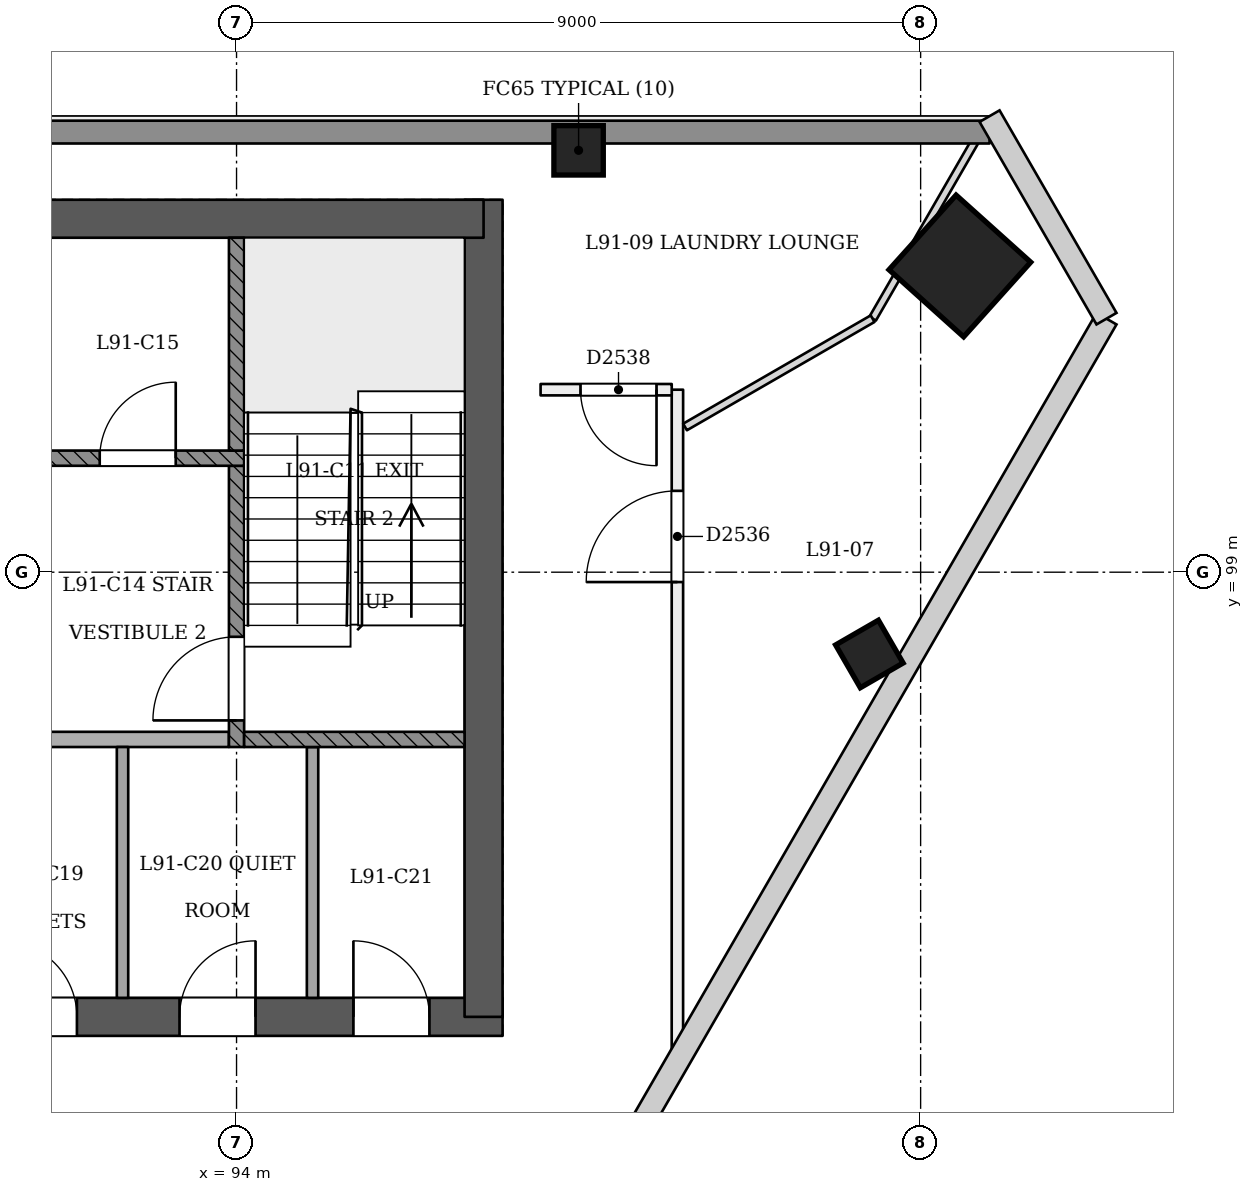
"""IFC4 building model, lengths in metres.
Left out: names, types, materials, properties, quantities, classifications, styles, units other than length and angle.
Written with IfcOpenShell. Run it as: python <this file> out.ifc"""

import sys

from ifc_helpers import new_model, si_unit, direction, frame, frame_2d, origin, origin_2d, place, context, subcontext, project, spatial, rectangle, extrude, element, fill, save


model = new_model("IFC4")
c1 = context("Model", 3, precision=1e-05, world=origin(), true_north=direction((0.0, 1.0)))
c2 = subcontext(c1, "Body", "Model", "MODEL_VIEW")
j1 = project(units=[si_unit("LENGTHUNIT", "METRE"), si_unit("PLANEANGLEUNIT", "RADIAN")], contexts=[c1])
p1 = place(None, origin())
s1 = spatial("IfcSite", under=j1, at=p1, CompositionType="ELEMENT")
p2 = place(p1, origin())
s2 = spatial("IfcBuilding", under=s1, at=p2, CompositionType="ELEMENT")
p3 = place(p2, frame((0.0, 0.0, 350.8)))
s3 = spatial("IfcBuildingStorey", under=s2, at=p3, CompositionType="ELEMENT", Elevation=350.8)
p4 = place(p3, frame((72.75, 93.15, 0.0), z_axis=(0.0, 0.0, 1.0), x_axis=(1.0, 0.0, 0.0)))
e1 = element("IfcWall", 1, at=p4, inside=s3, PredefinedType="SHEAR", context=c2, shape_type="SweptSolid", body=[
    extrude(rectangle(XDim=24.75, YDim=0.5, at=frame_2d((12.375, 0.0))), origin(), (0.0, 0.0, 1.0), 3.6),
])
p5 = place(p4, frame((1.05, 0.0, 0.0)))
e2 = element("IfcOpeningElement", 2, at=p5, cuts=e1, PredefinedType="OPENING", context=c2, shape_type="SweptSolid", body=[
    extrude(rectangle(XDim=1.2, YDim=2.1, at=frame_2d((0.6, 1.05))), frame((0.0, 0.26, 0.0), z_axis=(0.0, -1.0, 0.0), x_axis=(1.0, 0.0, 0.0)), (0.0, 0.0, 1.0), 0.521),
])
p6 = place(p4, frame((3.25, 0.0, 0.0)))
e3 = element("IfcOpeningElement", 3, at=p6, cuts=e1, PredefinedType="OPENING", context=c2, shape_type="SweptSolid", body=[
    extrude(rectangle(XDim=1.2, YDim=2.1, at=frame_2d((0.6, 1.05))), frame((0.0, 0.26, 0.0), z_axis=(0.0, -1.0, 0.0), x_axis=(1.0, 0.0, 0.0)), (0.0, 0.0, 1.0), 0.521),
])
p7 = place(p4, frame((13.25, 0.0, 0.0)))
e4 = element("IfcOpeningElement", 4, at=p7, cuts=e1, PredefinedType="OPENING", context=c2, shape_type="SweptSolid", body=[
    extrude(rectangle(XDim=1.2, YDim=2.1, at=frame_2d((0.6, 1.05))), frame((0.0, 0.26, 0.0), z_axis=(0.0, -1.0, 0.0), x_axis=(1.0, 0.0, 0.0)), (0.0, 0.0, 1.0), 0.521),
])
p8 = place(p4, frame((15.712, 0.0, 0.0)))
e5 = element("IfcOpeningElement", 5, at=p8, cuts=e1, PredefinedType="OPENING", context=c2, shape_type="SweptSolid", body=[
    extrude(rectangle(XDim=1.0, YDim=2.1, at=frame_2d((0.5, 1.05))), frame((0.0, 0.26, 0.0), z_axis=(0.0, -1.0, 0.0), x_axis=(1.0, 0.0, 0.0)), (0.0, 0.0, 1.0), 0.521),
])
p9 = place(p4, frame((18.15, 0.0, 0.0)))
e6 = element("IfcOpeningElement", 6, at=p9, cuts=e1, PredefinedType="OPENING", context=c2, shape_type="SweptSolid", body=[
    extrude(rectangle(XDim=1.0, YDim=2.1, at=frame_2d((0.5, 1.05))), frame((0.0, 0.26, 0.0), z_axis=(0.0, -1.0, 0.0), x_axis=(1.0, 0.0, 0.0)), (0.0, 0.0, 1.0), 0.521),
])
p10 = place(p4, frame((20.5, 0.0, 0.0)))
e7 = element("IfcOpeningElement", 7, at=p10, cuts=e1, PredefinedType="OPENING", context=c2, shape_type="SweptSolid", body=[
    extrude(rectangle(XDim=1.0, YDim=2.1, at=frame_2d((0.5, 1.05))), frame((0.0, 0.26, 0.0), z_axis=(0.0, -1.0, 0.0), x_axis=(1.0, 0.0, 0.0)), (0.0, 0.0, 1.0), 0.521),
])
p11 = place(p4, frame((22.788, 0.0, 0.0)))
e8 = element("IfcOpeningElement", 8, at=p11, cuts=e1, PredefinedType="OPENING", context=c2, shape_type="SweptSolid", body=[
    extrude(rectangle(XDim=1.0, YDim=2.1, at=frame_2d((0.5, 1.05))), frame((0.0, 0.26, 0.0), z_axis=(0.0, -1.0, 0.0), x_axis=(1.0, 0.0, 0.0)), (0.0, 0.0, 1.0), 0.521),
])
p12 = place(p3, frame((97.25, 93.15, 0.0), z_axis=(0.0, 0.0, 1.0), x_axis=(0.0, 1.0, 0.0)))
e9 = element("IfcWall", 9, at=p12, inside=s3, PredefinedType="SHEAR", context=c2, shape_type="SweptSolid", body=[
    extrude(rectangle(XDim=10.75, YDim=0.5, at=frame_2d((5.375, 0.0))), origin(), (0.0, 0.0, 1.0), 3.6),
])
p13 = place(p3, frame((97.25, 103.65, 0.0), z_axis=(0.0, 0.0, 1.0), x_axis=(-1.0, 0.0, 0.0)))
e10 = element("IfcWall", 10, at=p13, inside=s3, PredefinedType="SHEAR", context=c2, shape_type="SweptSolid", body=[
    extrude(rectangle(XDim=24.75, YDim=0.5, at=frame_2d((12.375, 0.0))), origin(), (0.0, 0.0, 1.0), 3.6),
])
p14 = place(p3, frame((103.55, 103.018, 0.0), z_axis=(-0.028403721265, 0.009287135593, 0.999553389135), x_axis=(0.498891314878, -0.866379500861, 0.022226480336)))
e11 = element("IfcColumn", 11, at=p14, inside=s3, PredefinedType="COLUMN", context=c2, shape_type="SweptSolid", body=[
    extrude(rectangle(XDim=1.32, YDim=1.32, at=origin_2d()), origin(), (0.0, 0.0, 1.0), 3.602),
])
p15 = place(p3, frame((98.5, 104.55, 0.0), z_axis=(0.0, 0.0, 1.0), x_axis=(1.0, 0.0, 0.0)))
e12 = element("IfcColumn", 12, at=p15, inside=s3, PredefinedType="COLUMN", context=c2, shape_type="SweptSolid", body=[
    extrude(rectangle(XDim=0.65, YDim=0.65, at=origin_2d()), origin(), (0.0, 0.0, 1.0), 3.6),
])
p16 = place(p3, frame((102.353, 97.877, -0.02), z_axis=(-0.022153634206, 0.038480930364, 0.999013730882), x_axis=(-0.501312914587, -0.864981193481, 0.022201274571)))
e13 = element("IfcColumn", 13, at=p16, inside=s3, PredefinedType="COLUMN", context=c2, shape_type="SweptSolid", body=[
    extrude(rectangle(XDim=0.65, YDim=0.65, at=origin_2d()), origin(), (0.0, 0.0, 1.0), 3.604),
])
p17 = place(p3, frame((99.8, 92.685, 0.0), z_axis=(0.0, 0.0, 1.0), x_axis=(2.8011989e-05, 0.999999999608, 0.0)))
e14 = element("IfcWall", 14, at=p17, inside=s3, PredefinedType="PARTITIONING", context=c2, shape_type="SweptSolid", body=[
    extrude(rectangle(XDim=8.716, YDim=0.15, at=frame_2d((4.358, 0.0))), origin(), (0.0, 0.0, 1.0), 2.7),
])
p18 = place(p17, frame((6.185, 0.0, 0.0)))
e15 = element("IfcOpeningElement", 15, at=p18, cuts=e14, PredefinedType="OPENING", context=c2, shape_type="SweptSolid", body=[
    extrude(rectangle(XDim=1.2, YDim=2.1, at=frame_2d((0.6, 1.05))), frame((0.0, 0.085, 0.0), z_axis=(0.0, -1.0, 0.0), x_axis=(1.0, 0.0, 0.0)), (0.0, 0.0, 1.0), 0.171),
])
p19 = place(p3, frame((99.725, 101.401, 0.0), z_axis=(0.0, 0.0, 1.0), x_axis=(-1.0, 0.0, 0.0)))
e16 = element("IfcWall", 16, at=p19, inside=s3, PredefinedType="PARTITIONING", context=c2, shape_type="SweptSolid", body=[
    extrude(rectangle(XDim=1.725, YDim=0.15, at=frame_2d((0.863, 0.0))), origin(), (0.0, 0.0, 1.0), 3.2),
])
p20 = place(p19, frame((0.2, 0.0, 0.0)))
e17 = element("IfcOpeningElement", 17, at=p20, cuts=e16, PredefinedType="OPENING", context=c2, shape_type="SweptSolid", body=[
    extrude(rectangle(XDim=1.0, YDim=2.1, at=frame_2d((0.5, 1.05))), frame((0.0, 0.085, 0.0), z_axis=(0.0, -1.0, 0.0), x_axis=(1.0, 0.0, 0.0)), (0.0, 0.0, 1.0), 0.171),
])
p21 = place(p3, frame((103.849, 104.9, 0.0), z_axis=(0.0, 0.0, 1.0), x_axis=(-0.499996007168, -0.866027709035, 0.0)))
e18 = element("IfcWall", 18, at=p21, inside=s3, PredefinedType="PARTITIONING", context=c2, shape_type="SweptSolid", body=[
    extrude(rectangle(XDim=2.961, YDim=0.1, at=frame_2d((1.481, 0.0))), origin(), (0.0, 0.0, 1.0), 2.7),
])
p22 = place(p3, frame((102.368, 102.335, 0.0), z_axis=(0.0, 0.0, 1.0), x_axis=(-0.866041498374, -0.499972122318, 0.0)))
e19 = element("IfcWall", 19, at=p22, inside=s3, PredefinedType="PARTITIONING", context=c2, shape_type="SweptSolid", body=[
    extrude(rectangle(XDim=2.85, YDim=0.1, at=frame_2d((1.425, 0.0))), origin(), (0.0, 0.0, 1.0), 3.2),
])
p23 = place(p3, frame((66.093, 104.79, 0.0), z_axis=(0.0, 0.0, 1.0), x_axis=(1.0, 0.0, 0.0)))
e20 = element("IfcWall", 20, at=p23, inside=s3, PredefinedType="SOLIDWALL", context=c2, shape_type="SweptSolid", body=[
    extrude(rectangle(XDim=37.813, YDim=0.3, at=frame_2d((18.907, 0.0))), origin(), (0.0, 0.0, 1.0), 2.7),
])
for number, where, z_axis, x_axis in (
    (21, (92.5, 93.4, 0.0), (0.0, 0.0, 1.0), (0.0, 1.0, 0.0)),
    (22, (95.0, 93.4, 0.0), (0.0, 0.0, 1.0), (0.0, 1.0, 0.0)),
):
    element("IfcWall", number, at=place(p3, frame(where, z_axis=z_axis, x_axis=x_axis)), inside=s3, PredefinedType="PARTITIONING", context=c2, shape_type="SweptSolid", body=[
        extrude(rectangle(XDim=3.3, YDim=0.15, at=frame_2d((1.65, 0.0))), origin(), (0.0, 0.0, 1.0), 3.2),
    ])
p24 = place(p3, frame((91.5, 96.8, 0.0), z_axis=(0.0, 0.0, 1.0), x_axis=(1.0, 0.0, 0.0)))
e23 = element("IfcWall", 23, at=p24, inside=s3, PredefinedType="PARTITIONING", context=c2, shape_type="SweptSolid", body=[
    extrude(rectangle(XDim=2.4, YDim=0.2, at=frame_2d((1.2, 0.0))), origin(), (0.0, 0.0, 1.0), 3.2),
])
p25 = place(p3, frame((94.0, 96.7, 0.0), z_axis=(0.0, 0.0, 1.0), x_axis=(0.0, 1.0, 0.0)))
e24 = element("IfcWall", 24, at=p25, inside=s3, PredefinedType="SOLIDWALL", context=c2, shape_type="SweptSolid", body=[
    extrude(rectangle(XDim=3.7, YDim=0.2, at=frame_2d((1.85, 0.0))), origin(), (0.0, 0.0, 1.0), 3.2),
])
p26 = place(p25, frame((0.35, 0.0, 0.0)))
e25 = element("IfcOpeningElement", 25, at=p26, cuts=e24, PredefinedType="OPENING", context=c2, shape_type="SweptSolid", body=[
    extrude(rectangle(XDim=1.1, YDim=2.1, at=frame_2d((0.55, 1.05))), frame((0.0, 0.11, 0.0), z_axis=(0.0, -1.0, 0.0), x_axis=(1.0, 0.0, 0.0)), (0.0, 0.0, 1.0), 0.221),
])
p27 = place(p3, frame((94.1, 96.8, 0.0), z_axis=(0.0, 0.0, 1.0), x_axis=(1.0, 0.0, 0.0)))
e26 = element("IfcWall", 26, at=p27, inside=s3, PredefinedType="SOLIDWALL", context=c2, shape_type="SweptSolid", body=[
    extrude(rectangle(XDim=2.9, YDim=0.2, at=frame_2d((1.45, 0.0))), origin(), (0.0, 0.0, 1.0), 3.2),
])
p28 = place(p3, frame((75.9, 100.5, 0.0), z_axis=(0.0, 0.0, 1.0), x_axis=(1.0, 0.0, 0.0)))
e27 = element("IfcWall", 27, at=p28, inside=s3, PredefinedType="SOLIDWALL", context=c2, shape_type="SweptSolid", body=[
    extrude(rectangle(XDim=18.2, YDim=0.2, at=frame_2d((9.1, 0.0))), origin(), (0.0, 0.0, 1.0), 3.2),
])
p29 = place(p28, frame((2.6, 0.0, 0.0)))
e28 = element("IfcOpeningElement", 28, at=p29, cuts=e27, PredefinedType="OPENING", context=c2, shape_type="SweptSolid", body=[
    extrude(rectangle(XDim=1.1, YDim=2.1, at=frame_2d((0.55, 1.05))), frame((0.0, 0.11, 0.0), z_axis=(0.0, -1.0, 0.0), x_axis=(1.0, 0.0, 0.0)), (0.0, 0.0, 1.0), 0.221),
])
p30 = place(p28, frame((4.5, 0.0, 0.0)))
e29 = element("IfcOpeningElement", 29, at=p30, cuts=e27, PredefinedType="OPENING", context=c2, shape_type="SweptSolid", body=[
    extrude(rectangle(XDim=1.1, YDim=2.1, at=frame_2d((0.55, 1.05))), frame((0.0, 0.11, 0.0), z_axis=(0.0, -1.0, 0.0), x_axis=(1.0, 0.0, 0.0)), (0.0, 0.0, 1.0), 0.221),
])
p31 = place(p28, frame((6.4, 0.0, 0.0)))
e30 = element("IfcOpeningElement", 30, at=p31, cuts=e27, PredefinedType="OPENING", context=c2, shape_type="SweptSolid", body=[
    extrude(rectangle(XDim=1.1, YDim=2.1, at=frame_2d((0.55, 1.05))), frame((0.0, 0.11, 0.0), z_axis=(0.0, -1.0, 0.0), x_axis=(1.0, 0.0, 0.0)), (0.0, 0.0, 1.0), 0.221),
])
p32 = place(p28, frame((8.3, 0.0, 0.0)))
e31 = element("IfcOpeningElement", 31, at=p32, cuts=e27, PredefinedType="OPENING", context=c2, shape_type="SweptSolid", body=[
    extrude(rectangle(XDim=1.1, YDim=2.1, at=frame_2d((0.55, 1.05))), frame((0.0, 0.11, 0.0), z_axis=(0.0, -1.0, 0.0), x_axis=(1.0, 0.0, 0.0)), (0.0, 0.0, 1.0), 0.221),
])
p33 = place(p28, frame((10.2, 0.0, 0.0)))
e32 = element("IfcOpeningElement", 32, at=p33, cuts=e27, PredefinedType="OPENING", context=c2, shape_type="SweptSolid", body=[
    extrude(rectangle(XDim=1.1, YDim=2.1, at=frame_2d((0.55, 1.05))), frame((0.0, 0.11, 0.0), z_axis=(0.0, -1.0, 0.0), x_axis=(1.0, 0.0, 0.0)), (0.0, 0.0, 1.0), 0.221),
])
p34 = place(p28, frame((12.1, 0.0, 0.0)))
e33 = element("IfcOpeningElement", 33, at=p34, cuts=e27, PredefinedType="OPENING", context=c2, shape_type="SweptSolid", body=[
    extrude(rectangle(XDim=1.1, YDim=2.1, at=frame_2d((0.55, 1.05))), frame((0.0, 0.11, 0.0), z_axis=(0.0, -1.0, 0.0), x_axis=(1.0, 0.0, 0.0)), (0.0, 0.0, 1.0), 0.221),
])
p35 = place(p28, frame((14.0, 0.0, 0.0)))
e34 = element("IfcOpeningElement", 34, at=p35, cuts=e27, PredefinedType="OPENING", context=c2, shape_type="SweptSolid", body=[
    extrude(rectangle(XDim=1.1, YDim=2.1, at=frame_2d((0.55, 1.05))), frame((0.0, 0.11, 0.0), z_axis=(0.0, -1.0, 0.0), x_axis=(1.0, 0.0, 0.0)), (0.0, 0.0, 1.0), 0.221),
])
p36 = place(p28, frame((0.65, 0.0, 0.0)))
e35 = element("IfcOpeningElement", 35, at=p36, cuts=e27, PredefinedType="OPENING", context=c2, shape_type="SweptSolid", body=[
    extrude(rectangle(XDim=1.0, YDim=2.1, at=frame_2d((0.5, 1.05))), frame((0.0, 0.11, 0.0), z_axis=(0.0, -1.0, 0.0), x_axis=(1.0, 0.0, 0.0)), (0.0, 0.0, 1.0), 0.221),
])
p37 = place(p28, frame((16.3, 0.0, 0.0)))
e36 = element("IfcOpeningElement", 36, at=p37, cuts=e27, PredefinedType="OPENING", context=c2, shape_type="SweptSolid", body=[
    extrude(rectangle(XDim=1.0, YDim=2.1, at=frame_2d((0.5, 1.05))), frame((0.0, 0.11, 0.0), z_axis=(0.0, -1.0, 0.0), x_axis=(1.0, 0.0, 0.0)), (0.0, 0.0, 1.0), 0.221),
])
p38 = place(p3, frame((94.0, 100.6, 0.0), z_axis=(0.0, 0.0, 1.0), x_axis=(0.0, 1.0, 0.0)))
e37 = element("IfcWall", 37, at=p38, inside=s3, PredefinedType="SOLIDWALL", context=c2, shape_type="SweptSolid", body=[
    extrude(rectangle(XDim=2.8, YDim=0.2, at=frame_2d((1.4, 0.0))), origin(), (0.0, 0.0, 1.0), 3.2),
])
p39 = place(p18, origin())
e38 = element("IfcDoor", 38, at=p39, inside=s3, OperationType="SINGLE_SWING_LEFT", PredefinedType="NOTDEFINED", context=c2, shape_type="SweptSolid", body=[
    extrude(rectangle(XDim=1.2, YDim=2.1, at=frame_2d((0.6, 1.05))), frame((0.0, 0.025, 0.0), z_axis=(0.0, -1.0, 0.0), x_axis=(1.0, 0.0, 0.0)), (0.0, 0.0, 1.0), 0.05),
])
fill(e15, e38)
p40 = place(p20, origin())
e39 = element("IfcDoor", 39, at=p40, inside=s3, OperationType="SINGLE_SWING_LEFT", PredefinedType="NOTDEFINED", context=c2, shape_type="SweptSolid", body=[
    extrude(rectangle(XDim=1.0, YDim=2.1, at=frame_2d((0.5, 1.05))), frame((0.0, 0.025, 0.0), z_axis=(0.0, -1.0, 0.0), x_axis=(1.0, 0.0, 0.0)), (0.0, 0.0, 1.0), 0.05),
])
fill(e17, e39)
p41 = place(p26, origin())
e40 = element("IfcDoor", 40, at=p41, inside=s3, OperationType="SINGLE_SWING_LEFT", PredefinedType="NOTDEFINED", context=c2, shape_type="SweptSolid", body=[
    extrude(rectangle(XDim=1.1, YDim=2.1, at=frame_2d((0.55, 1.05))), frame((0.0, 0.025, 0.0), z_axis=(0.0, -1.0, 0.0), x_axis=(1.0, 0.0, 0.0)), (0.0, 0.0, 1.0), 0.05),
])
fill(e25, e40)
p42 = place(p37, origin())
e41 = element("IfcDoor", 41, at=p42, inside=s3, OperationType="SINGLE_SWING_RIGHT", PredefinedType="NOTDEFINED", context=c2, shape_type="SweptSolid", body=[
    extrude(rectangle(XDim=1.0, YDim=2.1, at=frame_2d((0.5, 1.05))), frame((0.0, 0.025, 0.0), z_axis=(0.0, -1.0, 0.0), x_axis=(1.0, 0.0, 0.0)), (0.0, 0.0, 1.0), 0.05),
])
fill(e36, e41)
p43 = place(p9, origin())
e42 = element("IfcDoor", 42, at=p43, inside=s3, OperationType="SINGLE_SWING_LEFT", PredefinedType="NOTDEFINED", context=c2, shape_type="SweptSolid", body=[
    extrude(rectangle(XDim=1.0, YDim=2.1, at=frame_2d((0.5, 1.05))), frame((0.0, 0.025, 0.0), z_axis=(0.0, -1.0, 0.0), x_axis=(1.0, 0.0, 0.0)), (0.0, 0.0, 1.0), 0.05),
])
fill(e6, e42)
p44 = place(p10, origin())
e43 = element("IfcDoor", 43, at=p44, inside=s3, OperationType="SINGLE_SWING_RIGHT", PredefinedType="NOTDEFINED", context=c2, shape_type="SweptSolid", body=[
    extrude(rectangle(XDim=1.0, YDim=2.1, at=frame_2d((0.5, 1.05))), frame((0.0, 0.025, 0.0), z_axis=(0.0, -1.0, 0.0), x_axis=(1.0, 0.0, 0.0)), (0.0, 0.0, 1.0), 0.05),
])
fill(e7, e43)
p45 = place(p11, origin())
e44 = element("IfcDoor", 44, at=p45, inside=s3, OperationType="SINGLE_SWING_LEFT", PredefinedType="NOTDEFINED", context=c2, shape_type="SweptSolid", body=[
    extrude(rectangle(XDim=1.0, YDim=2.1, at=frame_2d((0.5, 1.05))), frame((0.0, 0.025, 0.0), z_axis=(0.0, -1.0, 0.0), x_axis=(1.0, 0.0, 0.0)), (0.0, 0.0, 1.0), 0.05),
])
fill(e8, e44)
save(model, sys.argv[1])
